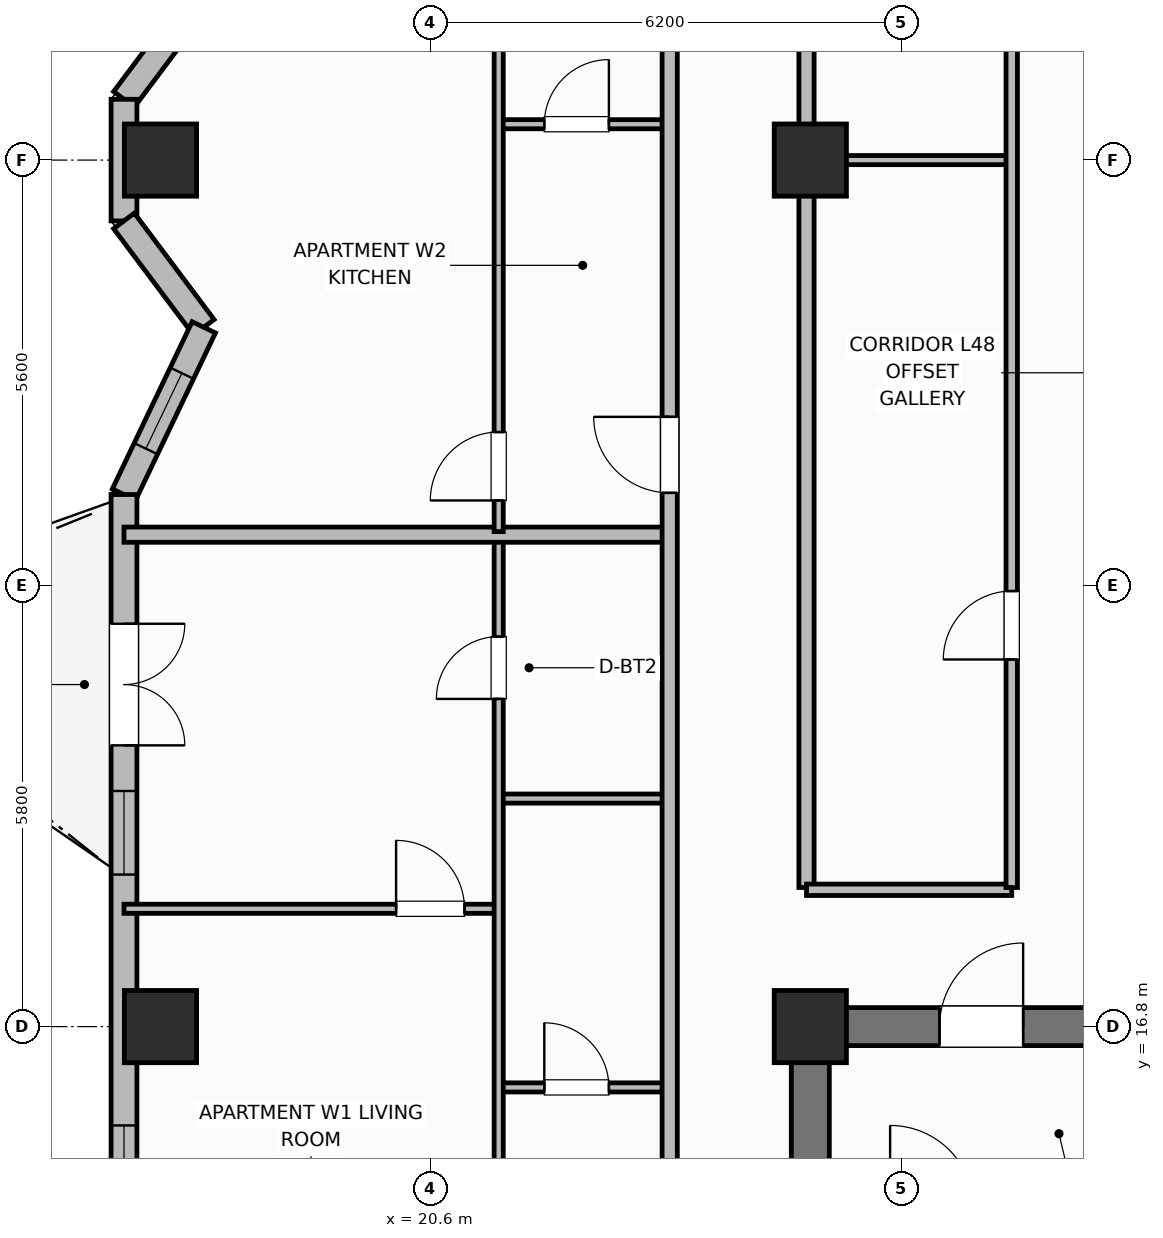
"""IFC4 building model, lengths in metres.
Left out: names, types, materials, properties, quantities, classifications, styles, units other than length and angle.
Written with IfcOpenShell. Run it as: python <this file> out.ifc"""

import sys

from ifc_helpers import new_model, si_unit, direction, frame, frame_2d, origin, origin_2d, place, context, subcontext, project, spatial, rectangle, extrude, element, fill, save


model = new_model("IFC4")
c1 = context("Model", 3, precision=1e-05, world=origin(), true_north=direction((0.0, 1.0)))
c2 = subcontext(c1, "Body", "Model", "MODEL_VIEW")
j1 = project(units=[si_unit("LENGTHUNIT", "METRE"), si_unit("PLANEANGLEUNIT", "RADIAN")], contexts=[c1])
p1 = place(None, origin())
s1 = spatial("IfcSite", under=j1, at=p1, CompositionType="ELEMENT")
p2 = place(p1, origin())
s2 = spatial("IfcBuilding", under=s1, at=p2, CompositionType="ELEMENT")
p3 = place(p2, frame((0.0, 0.0, 192.2)))
s3 = spatial("IfcBuildingStorey", under=s2, at=p3, CompositionType="ELEMENT", Elevation=192.2)
p4 = place(p3, frame((25.6, 10.85, 0.0), z_axis=(0.0, 0.0, 1.0), x_axis=(0.0, 1.0, 0.0)))
e1 = element("IfcWall", 1, at=p4, inside=s3, PredefinedType="SHEAR", context=c2, shape_type="SweptSolid", body=[
    extrude(rectangle(XDim=5.7, YDim=0.5, at=frame_2d((2.85, 0.0))), origin(), (0.0, 0.0, 1.0), 3.7),
])
p5 = place(p3, frame((25.6, 16.8, 0.0), z_axis=(0.0, 0.0, 1.0), x_axis=(1.0, 0.0, 0.0)))
e2 = element("IfcWall", 2, at=p5, inside=s3, PredefinedType="SHEAR", context=c2, shape_type="SweptSolid", body=[
    extrude(rectangle(XDim=27.2, YDim=0.5, at=frame_2d((13.6, 0.0))), origin(), (0.0, 0.0, 1.0), 3.7),
])
p6 = place(p5, frame((1.7, 0.0, 0.0)))
e3 = element("IfcOpeningElement", 3, at=p6, cuts=e2, PredefinedType="OPENING", context=c2, shape_type="SweptSolid", body=[
    extrude(rectangle(XDim=1.1, YDim=2.15, at=frame_2d((0.55, 1.075))), frame((0.0, 0.26, 0.0), z_axis=(0.0, -1.0, 0.0), x_axis=(1.0, 0.0, 0.0)), (0.0, 0.0, 1.0), 0.52),
])
p7 = place(p5, frame((4.45, 0.0, 0.0)))
e4 = element("IfcOpeningElement", 4, at=p7, cuts=e2, PredefinedType="OPENING", context=c2, shape_type="SweptSolid", body=[
    extrude(rectangle(XDim=0.85, YDim=2.1, at=frame_2d((0.425, 1.05))), frame((0.0, 0.26, 0.0), z_axis=(0.0, -1.0, 0.0), x_axis=(1.0, 0.0, 0.0)), (0.0, 0.0, 1.0), 0.52),
])
p8 = place(p5, frame((6.5, 0.0, 0.0)))
e5 = element("IfcOpeningElement", 5, at=p8, cuts=e2, PredefinedType="OPENING", context=c2, shape_type="SweptSolid", body=[
    extrude(rectangle(XDim=0.85, YDim=2.1, at=frame_2d((0.425, 1.05))), frame((0.0, 0.26, 0.0), z_axis=(0.0, -1.0, 0.0), x_axis=(1.0, 0.0, 0.0)), (0.0, 0.0, 1.0), 0.52),
])
p9 = place(p5, frame((13.0, 0.0, 0.0)))
e6 = element("IfcOpeningElement", 6, at=p9, cuts=e2, PredefinedType="OPENING", context=c2, shape_type="SweptSolid", body=[
    extrude(rectangle(XDim=1.2, YDim=2.15, at=frame_2d((0.6, 1.075))), frame((0.0, 0.26, 0.0), z_axis=(0.0, -1.0, 0.0), x_axis=(1.0, 0.0, 0.0)), (0.0, 0.0, 1.0), 0.52),
])
p10 = place(p5, frame((19.8, 0.0, 0.0)))
e7 = element("IfcOpeningElement", 7, at=p10, cuts=e2, PredefinedType="OPENING", context=c2, shape_type="SweptSolid", body=[
    extrude(rectangle(XDim=0.85, YDim=2.1, at=frame_2d((0.425, 1.05))), frame((0.0, 0.26, 0.0), z_axis=(0.0, -1.0, 0.0), x_axis=(1.0, 0.0, 0.0)), (0.0, 0.0, 1.0), 0.52),
])
p11 = place(p5, frame((24.2, 0.0, 0.0)))
e8 = element("IfcOpeningElement", 8, at=p11, cuts=e2, PredefinedType="OPENING", context=c2, shape_type="SweptSolid", body=[
    extrude(rectangle(XDim=0.85, YDim=2.1, at=frame_2d((0.425, 1.05))), frame((0.0, 0.26, 0.0), z_axis=(0.0, -1.0, 0.0), x_axis=(1.0, 0.0, 0.0)), (0.0, 0.0, 1.0), 0.52),
])
for number, where, z_axis, x_axis in (
    (9, (25.6, 16.8, 0.0), (0.0, 0.0, 1.0), (1.0, 0.0, 0.0)),
    (10, (25.6, 28.2, 0.0), (0.0, 0.0, 1.0), (1.0, 0.0, 0.0)),
    (11, (17.05, 16.8, 0.0), (0.0, 0.0, 1.0), (1.0, 0.0, 0.0)),
    (12, (17.05, 28.2, 0.0), (0.0, 0.0, 1.0), (1.0, 0.0, 0.0)),
):
    element("IfcColumn", number, at=place(p3, frame(where, z_axis=z_axis, x_axis=x_axis)), inside=s3, PredefinedType="COLUMN", context=c2, shape_type="SweptSolid", body=[
        extrude(rectangle(XDim=0.95, YDim=0.95, at=origin_2d()), origin(), (0.0, 0.0, 1.0), 3.7),
    ])
p12 = place(p3, frame((17.62, 30.4, 0.0), z_axis=(0.0, 0.0, 1.0), x_axis=(-0.600044643168, -0.799966515677, 0.0)))
e13 = element("IfcWall", 13, at=p12, inside=s3, PredefinedType="SOLIDWALL", context=c2, shape_type="SweptSolid", body=[
    extrude(rectangle(XDim=1.75, YDim=0.34, at=frame_2d((0.875, 0.0))), origin(), (0.0, 0.0, 1.0), 2.66),
])
p13 = place(p3, frame((16.57, 29.0, 0.0), z_axis=(0.0, 0.0, 1.0), x_axis=(0.0, -1.0, 0.0)))
e14 = element("IfcWall", 14, at=p13, inside=s3, PredefinedType="SOLIDWALL", context=c2, shape_type="SweptSolid", body=[
    extrude(rectangle(XDim=1.6, YDim=0.34, at=frame_2d((0.8, 0.0))), origin(), (0.0, 0.0, 1.0), 2.66),
])
p14 = place(p3, frame((16.57, 27.4, 0.0), z_axis=(0.0, 0.0, 1.0), x_axis=(0.600044643168, -0.799966515677, 0.0)))
e15 = element("IfcWall", 15, at=p14, inside=s3, PredefinedType="SOLIDWALL", context=c2, shape_type="SweptSolid", body=[
    extrude(rectangle(XDim=1.75, YDim=0.34, at=frame_2d((0.875, 0.0))), origin(), (0.0, 0.0, 1.0), 2.66),
])
p15 = place(p3, frame((17.62, 26.0, 0.0), z_axis=(0.0, 0.0, 1.0), x_axis=(-0.430753686581, -0.902469534941, 0.0)))
e16 = element("IfcWall", 16, at=p15, inside=s3, PredefinedType="SOLIDWALL", context=c2, shape_type="SweptSolid", body=[
    extrude(rectangle(XDim=2.438, YDim=0.34, at=frame_2d((1.219, 0.0))), origin(), (0.0, 0.0, 1.0), 2.66),
])
p16 = place(p15, frame((0.669, 0.0, 0.85)))
e17 = element("IfcOpeningElement", 17, at=p16, cuts=e16, PredefinedType="OPENING", context=c2, shape_type="SweptSolid", body=[
    extrude(rectangle(XDim=1.1, YDim=1.65, at=frame_2d((0.55, 0.825))), frame((0.0, 0.18, 0.0), z_axis=(0.0, -1.0, 0.0), x_axis=(1.0, 0.0, 0.0)), (0.0, 0.0, 1.0), 0.36),
])
p17 = place(p3, frame((16.57, 23.8, 0.0), z_axis=(0.0, 0.0, 1.0), x_axis=(0.0, -1.0, 0.0)))
e18 = element("IfcWall", 18, at=p17, inside=s3, PredefinedType="SOLIDWALL", context=c2, shape_type="SweptSolid", body=[
    extrude(rectangle(XDim=13.3, YDim=0.34, at=frame_2d((6.65, 0.0))), origin(), (0.0, 0.0, 1.0), 2.66),
])
p18 = place(p17, frame((1.7, 0.0, 0.0)))
e19 = element("IfcOpeningElement", 19, at=p18, cuts=e18, PredefinedType="OPENING", context=c2, shape_type="SweptSolid", body=[
    extrude(rectangle(XDim=1.6, YDim=2.1, at=frame_2d((0.8, 1.05))), frame((0.0, 0.18, 0.0), z_axis=(0.0, -1.0, 0.0), x_axis=(1.0, 0.0, 0.0)), (0.0, 0.0, 1.0), 0.36),
])
p19 = place(p17, frame((3.9, 0.0, 0.89)))
e20 = element("IfcOpeningElement", 20, at=p19, cuts=e18, PredefinedType="OPENING", context=c2, shape_type="SweptSolid", body=[
    extrude(rectangle(XDim=1.1, YDim=1.65, at=frame_2d((0.55, 0.825))), frame((0.0, 0.18, 0.0), z_axis=(0.0, -1.0, 0.0), x_axis=(1.0, 0.0, 0.0)), (0.0, 0.0, 1.0), 0.36),
])
p20 = place(p17, frame((8.3, 0.0, 0.89)))
e21 = element("IfcOpeningElement", 21, at=p20, cuts=e18, PredefinedType="OPENING", context=c2, shape_type="SweptSolid", body=[
    extrude(rectangle(XDim=1.1, YDim=1.65, at=frame_2d((0.55, 0.825))), frame((0.0, 0.18, 0.0), z_axis=(0.0, -1.0, 0.0), x_axis=(1.0, 0.0, 0.0)), (0.0, 0.0, 1.0), 0.36),
])
p21 = place(p17, frame((10.6, 0.0, 0.89)))
e22 = element("IfcOpeningElement", 22, at=p21, cuts=e18, PredefinedType="OPENING", context=c2, shape_type="SweptSolid", body=[
    extrude(rectangle(XDim=1.1, YDim=1.65, at=frame_2d((0.55, 0.825))), frame((0.0, 0.18, 0.0), z_axis=(0.0, -1.0, 0.0), x_axis=(1.0, 0.0, 0.0)), (0.0, 0.0, 1.0), 0.36),
])
p22 = place(p3, frame((25.55, 18.63, 0.0), z_axis=(0.0, 0.0, 1.0), x_axis=(0.0, 1.0, 0.0)))
e23 = element("IfcWall", 23, at=p22, inside=s3, PredefinedType="PARTITIONING", context=c2, shape_type="SweptSolid", body=[
    extrude(rectangle(XDim=19.14, YDim=0.2, at=frame_2d((9.57, 0.0))), origin(), (0.0, 0.0, 1.0), 2.49),
])
p23 = place(p3, frame((25.55, 18.6, 0.0), z_axis=(0.0, 0.0, 1.0), x_axis=(1.0, 0.0, 0.0)))
e24 = element("IfcWall", 24, at=p23, inside=s3, PredefinedType="PARTITIONING", context=c2, shape_type="SweptSolid", body=[
    extrude(rectangle(XDim=2.7, YDim=0.15, at=frame_2d((1.35, 0.0))), origin(), (0.0, 0.0, 1.0), 2.49),
])
p24 = place(p3, frame((25.6, 28.2, 0.0), z_axis=(0.0, 0.0, 1.0), x_axis=(1.0, 0.0, 0.0)))
e25 = element("IfcWall", 25, at=p24, inside=s3, PredefinedType="PARTITIONING", context=c2, shape_type="SweptSolid", body=[
    extrude(rectangle(XDim=2.66, YDim=0.12, at=frame_2d((1.33, 0.0))), origin(), (0.0, 0.0, 1.0), 2.49),
])
p25 = place(p3, frame((28.25, 18.63, 0.0), z_axis=(0.0, 0.0, 1.0), x_axis=(0.0, 1.0, 0.0)))
e26 = element("IfcWall", 26, at=p25, inside=s3, PredefinedType="PARTITIONING", context=c2, shape_type="SweptSolid", body=[
    extrude(rectangle(XDim=19.14, YDim=0.15, at=frame_2d((9.57, 0.0))), origin(), (0.0, 0.0, 1.0), 2.49),
])
p26 = place(p25, frame((3.0, 0.0, 0.0)))
e27 = element("IfcOpeningElement", 27, at=p26, cuts=e26, PredefinedType="OPENING", context=c2, shape_type="SweptSolid", body=[
    extrude(rectangle(XDim=0.9, YDim=2.1, at=frame_2d((0.45, 1.05))), frame((0.0, 0.085, 0.0), z_axis=(0.0, -1.0, 0.0), x_axis=(1.0, 0.0, 0.0)), (0.0, 0.0, 1.0), 0.17),
])
p27 = place(p25, frame((11.5, 0.0, 0.0)))
e28 = element("IfcOpeningElement", 28, at=p27, cuts=e26, PredefinedType="OPENING", context=c2, shape_type="SweptSolid", body=[
    extrude(rectangle(XDim=0.9, YDim=2.1, at=frame_2d((0.45, 1.05))), frame((0.0, 0.085, 0.0), z_axis=(0.0, -1.0, 0.0), x_axis=(1.0, 0.0, 0.0)), (0.0, 0.0, 1.0), 0.17),
])
p28 = place(p3, frame((21.5, 16.0, 0.0), z_axis=(0.0, 0.0, 1.0), x_axis=(1.0, 0.0, 0.0)))
e29 = element("IfcWall", 29, at=p28, inside=s3, PredefinedType="PARTITIONING", context=c2, shape_type="SweptSolid", body=[
    extrude(rectangle(XDim=2.25, YDim=0.12, at=frame_2d((1.125, 0.0))), origin(), (0.0, 0.0, 1.0), 2.49),
])
p29 = place(p28, frame((0.6, 0.0, 0.0)))
e30 = element("IfcOpeningElement", 30, at=p29, cuts=e29, PredefinedType="OPENING", context=c2, shape_type="SweptSolid", body=[
    extrude(rectangle(XDim=0.85, YDim=2.1, at=frame_2d((0.425, 1.05))), frame((0.0, 0.07, 0.0), z_axis=(0.0, -1.0, 0.0), x_axis=(1.0, 0.0, 0.0)), (0.0, 0.0, 1.0), 0.14),
])
p30 = place(p3, frame((21.5, 19.8, 0.0), z_axis=(0.0, 0.0, 1.0), x_axis=(1.0, 0.0, 0.0)))
e31 = element("IfcWall", 31, at=p30, inside=s3, PredefinedType="PARTITIONING", context=c2, shape_type="SweptSolid", body=[
    extrude(rectangle(XDim=2.25, YDim=0.12, at=frame_2d((1.125, 0.0))), origin(), (0.0, 0.0, 1.0), 2.49),
])
p31 = place(p3, frame((16.57, 18.35, 0.0), z_axis=(0.0, 0.0, 1.0), x_axis=(1.0, 0.0, 0.0)))
e32 = element("IfcWall", 32, at=p31, inside=s3, PredefinedType="PARTITIONING", context=c2, shape_type="SweptSolid", body=[
    extrude(rectangle(XDim=4.93, YDim=0.12, at=frame_2d((2.465, 0.0))), origin(), (0.0, 0.0, 1.0), 2.49),
])
p32 = place(p31, frame((3.58, 0.0, 0.0)))
e33 = element("IfcOpeningElement", 33, at=p32, cuts=e32, PredefinedType="OPENING", context=c2, shape_type="SweptSolid", body=[
    extrude(rectangle(XDim=0.9, YDim=2.1, at=frame_2d((0.45, 1.05))), frame((0.0, 0.07, 0.0), z_axis=(0.0, -1.0, 0.0), x_axis=(1.0, 0.0, 0.0)), (0.0, 0.0, 1.0), 0.14),
])
p33 = place(p3, frame((21.5, 10.64, 0.0), z_axis=(0.0, 0.0, 1.0), x_axis=(0.0, 1.0, 0.0)))
e34 = element("IfcWall", 34, at=p33, inside=s3, PredefinedType="PARTITIONING", context=c2, shape_type="SweptSolid", body=[
    extrude(rectangle(XDim=12.592, YDim=0.12, at=frame_2d((6.296, 0.0))), origin(), (0.0, 0.0, 1.0), 2.49),
])
p34 = place(p33, frame((0.41, 0.0, 0.0)))
e35 = element("IfcOpeningElement", 35, at=p34, cuts=e34, PredefinedType="OPENING", context=c2, shape_type="SweptSolid", body=[
    extrude(rectangle(XDim=0.9, YDim=2.1, at=frame_2d((0.45, 1.05))), frame((0.0, 0.07, 0.0), z_axis=(0.0, -1.0, 0.0), x_axis=(1.0, 0.0, 0.0)), (0.0, 0.0, 1.0), 0.14),
])
p35 = place(p33, frame((10.471, 0.0, 0.0)))
e36 = element("IfcOpeningElement", 36, at=p35, cuts=e34, PredefinedType="OPENING", context=c2, shape_type="SweptSolid", body=[
    extrude(rectangle(XDim=0.82, YDim=2.08, at=frame_2d((0.41, 1.04))), frame((0.0, 0.07, 0.0), z_axis=(0.0, -1.0, 0.0), x_axis=(1.0, 0.0, 0.0)), (0.0, 0.0, 1.0), 0.14),
])
p36 = place(p3, frame((16.57, 23.272, 0.0), z_axis=(0.0, 0.0, 1.0), x_axis=(1.0, 0.0, 0.0)))
e37 = element("IfcWall", 37, at=p36, inside=s3, PredefinedType="PARTITIONING", context=c2, shape_type="SweptSolid", body=[
    extrude(rectangle(XDim=7.18, YDim=0.2, at=frame_2d((3.59, 0.0))), origin(), (0.0, 0.0, 1.0), 2.49),
])
p37 = place(p3, frame((21.5, 28.672, 0.0), z_axis=(0.0, 0.0, 1.0), x_axis=(1.0, 0.0, 0.0)))
e38 = element("IfcWall", 38, at=p37, inside=s3, PredefinedType="PARTITIONING", context=c2, shape_type="SweptSolid", body=[
    extrude(rectangle(XDim=2.25, YDim=0.12, at=frame_2d((1.125, 0.0))), origin(), (0.0, 0.0, 1.0), 2.49),
])
p38 = place(p37, frame((0.6, 0.0, 0.0)))
e39 = element("IfcOpeningElement", 39, at=p38, cuts=e38, PredefinedType="OPENING", context=c2, shape_type="SweptSolid", body=[
    extrude(rectangle(XDim=0.85, YDim=2.1, at=frame_2d((0.425, 1.05))), frame((0.0, 0.07, 0.0), z_axis=(0.0, -1.0, 0.0), x_axis=(1.0, 0.0, 0.0)), (0.0, 0.0, 1.0), 0.14),
])
p39 = place(p3, frame((21.5, 23.312, 0.0), z_axis=(0.0, 0.0, 1.0), x_axis=(0.0, 1.0, 0.0)))
e40 = element("IfcWall", 40, at=p39, inside=s3, PredefinedType="PARTITIONING", context=c2, shape_type="SweptSolid", body=[
    extrude(rectangle(XDim=11.536, YDim=0.12, at=frame_2d((5.768, 0.0))), origin(), (0.0, 0.0, 1.0), 2.49),
])
p40 = place(p39, frame((0.41, 0.0, 0.0)))
e41 = element("IfcOpeningElement", 41, at=p40, cuts=e40, PredefinedType="OPENING", context=c2, shape_type="SweptSolid", body=[
    extrude(rectangle(XDim=0.9, YDim=2.1, at=frame_2d((0.45, 1.05))), frame((0.0, 0.07, 0.0), z_axis=(0.0, -1.0, 0.0), x_axis=(1.0, 0.0, 0.0)), (0.0, 0.0, 1.0), 0.14),
])
p41 = place(p3, frame((23.75, 10.6, 0.0), z_axis=(0.0, 0.0, 1.0), x_axis=(0.0, 1.0, 0.0)))
e42 = element("IfcWall", 42, at=p41, inside=s3, PredefinedType="PARTITIONING", context=c2, shape_type="SweptSolid", body=[
    extrude(rectangle(XDim=35.2, YDim=0.2, at=frame_2d((17.6, 0.0))), origin(), (0.0, 0.0, 1.0), 2.49),
])
p42 = place(p41, frame((2.65, 0.0, 0.0)))
e43 = element("IfcOpeningElement", 43, at=p42, cuts=e42, PredefinedType="OPENING", context=c2, shape_type="SweptSolid", body=[
    extrude(rectangle(XDim=1.0, YDim=2.15, at=frame_2d((0.5, 1.075))), frame((0.0, 0.11, 0.0), z_axis=(0.0, -1.0, 0.0), x_axis=(1.0, 0.0, 0.0)), (0.0, 0.0, 1.0), 0.22),
])
p43 = place(p41, frame((13.222, 0.0, 0.0)))
e44 = element("IfcOpeningElement", 44, at=p43, cuts=e42, PredefinedType="OPENING", context=c2, shape_type="SweptSolid", body=[
    extrude(rectangle(XDim=1.0, YDim=2.15, at=frame_2d((0.5, 1.075))), frame((0.0, 0.11, 0.0), z_axis=(0.0, -1.0, 0.0), x_axis=(1.0, 0.0, 0.0)), (0.0, 0.0, 1.0), 0.22),
])
p44 = place(p41, frame((24.838, 0.0, 0.0)))
e45 = element("IfcOpeningElement", 45, at=p44, cuts=e42, PredefinedType="OPENING", context=c2, shape_type="SweptSolid", body=[
    extrude(rectangle(XDim=1.0, YDim=2.15, at=frame_2d((0.5, 1.075))), frame((0.0, 0.11, 0.0), z_axis=(0.0, -1.0, 0.0), x_axis=(1.0, 0.0, 0.0)), (0.0, 0.0, 1.0), 0.22),
])
p45 = place(p16, origin())
e46 = element("IfcWindow", 46, at=p45, inside=s3, PartitioningType="SINGLE_PANEL", PredefinedType="WINDOW", context=c2, shape_type="SweptSolid", body=[
    extrude(rectangle(XDim=1.1, YDim=1.65, at=frame_2d((0.55, 0.825))), frame((0.0, 0.03, 0.0), z_axis=(0.0, -1.0, 0.0), x_axis=(1.0, 0.0, 0.0)), (0.0, 0.0, 1.0), 0.06),
])
fill(e17, e46)
p46 = place(p18, origin())
e47 = element("IfcDoor", 47, at=p46, inside=s3, OperationType="DOUBLE_DOOR_SINGLE_SWING", PredefinedType="DOOR", context=c2, shape_type="SweptSolid", body=[
    extrude(rectangle(XDim=1.6, YDim=2.1, at=frame_2d((0.8, 1.05))), frame((0.0, 0.025, 0.0), z_axis=(0.0, -1.0, 0.0), x_axis=(1.0, 0.0, 0.0)), (0.0, 0.0, 1.0), 0.05),
])
fill(e19, e47)
p47 = place(p19, origin())
e48 = element("IfcWindow", 48, at=p47, inside=s3, PartitioningType="SINGLE_PANEL", PredefinedType="WINDOW", context=c2, shape_type="SweptSolid", body=[
    extrude(rectangle(XDim=1.1, YDim=1.65, at=frame_2d((0.55, 0.825))), frame((0.0, 0.03, 0.0), z_axis=(0.0, -1.0, 0.0), x_axis=(1.0, 0.0, 0.0)), (0.0, 0.0, 1.0), 0.06),
])
fill(e20, e48)
p48 = place(p20, origin())
e49 = element("IfcWindow", 49, at=p48, inside=s3, PartitioningType="SINGLE_PANEL", PredefinedType="WINDOW", context=c2, shape_type="SweptSolid", body=[
    extrude(rectangle(XDim=1.1, YDim=1.65, at=frame_2d((0.55, 0.825))), frame((0.0, 0.03, 0.0), z_axis=(0.0, -1.0, 0.0), x_axis=(1.0, 0.0, 0.0)), (0.0, 0.0, 1.0), 0.06),
])
fill(e21, e49)
p49 = place(p26, origin())
e50 = element("IfcDoor", 50, at=p49, inside=s3, OperationType="SINGLE_SWING_LEFT", PredefinedType="DOOR", context=c2, shape_type="SweptSolid", body=[
    extrude(rectangle(XDim=0.9, YDim=2.1, at=frame_2d((0.45, 1.05))), frame((0.0, 0.025, 0.0), z_axis=(0.0, -1.0, 0.0), x_axis=(1.0, 0.0, 0.0)), (0.0, 0.0, 1.0), 0.05),
])
fill(e27, e50)
p50 = place(p29, origin())
e51 = element("IfcDoor", 51, at=p50, inside=s3, OperationType="SINGLE_SWING_LEFT", PredefinedType="DOOR", context=c2, shape_type="SweptSolid", body=[
    extrude(rectangle(XDim=0.85, YDim=2.1, at=frame_2d((0.425, 1.05))), frame((0.0, 0.025, 0.0), z_axis=(0.0, -1.0, 0.0), x_axis=(1.0, 0.0, 0.0)), (0.0, 0.0, 1.0), 0.05),
])
fill(e30, e51)
p51 = place(p32, origin())
e52 = element("IfcDoor", 52, at=p51, inside=s3, OperationType="SINGLE_SWING_LEFT", PredefinedType="DOOR", context=c2, shape_type="SweptSolid", body=[
    extrude(rectangle(XDim=0.9, YDim=2.1, at=frame_2d((0.45, 1.05))), frame((0.0, 0.025, 0.0), z_axis=(0.0, -1.0, 0.0), x_axis=(1.0, 0.0, 0.0)), (0.0, 0.0, 1.0), 0.05),
])
fill(e33, e52)
p52 = place(p35, origin())
e53 = element("IfcDoor", 53, at=p52, inside=s3, OperationType="SINGLE_SWING_LEFT", PredefinedType="DOOR", context=c2, shape_type="SweptSolid", body=[
    extrude(rectangle(XDim=0.82, YDim=2.08, at=frame_2d((0.41, 1.04))), frame((0.0, 0.025, 0.0), z_axis=(0.0, -1.0, 0.0), x_axis=(1.0, 0.0, 0.0)), (0.0, 0.0, 1.0), 0.05),
])
fill(e36, e53)
p53 = place(p38, origin())
e54 = element("IfcDoor", 54, at=p53, inside=s3, OperationType="SINGLE_SWING_RIGHT", PredefinedType="DOOR", context=c2, shape_type="SweptSolid", body=[
    extrude(rectangle(XDim=0.85, YDim=2.1, at=frame_2d((0.425, 1.05))), frame((0.0, 0.025, 0.0), z_axis=(0.0, -1.0, 0.0), x_axis=(1.0, 0.0, 0.0)), (0.0, 0.0, 1.0), 0.05),
])
fill(e39, e54)
p54 = place(p40, origin())
e55 = element("IfcDoor", 55, at=p54, inside=s3, OperationType="SINGLE_SWING_LEFT", PredefinedType="DOOR", context=c2, shape_type="SweptSolid", body=[
    extrude(rectangle(XDim=0.9, YDim=2.1, at=frame_2d((0.45, 1.05))), frame((0.0, 0.025, 0.0), z_axis=(0.0, -1.0, 0.0), x_axis=(1.0, 0.0, 0.0)), (0.0, 0.0, 1.0), 0.05),
])
fill(e41, e55)
p55 = place(p43, origin())
e56 = element("IfcDoor", 56, at=p55, inside=s3, OperationType="SINGLE_SWING_RIGHT", PredefinedType="DOOR", context=c2, shape_type="SweptSolid", body=[
    extrude(rectangle(XDim=1.0, YDim=2.15, at=frame_2d((0.5, 1.075))), frame((0.0, 0.025, 0.0), z_axis=(0.0, -1.0, 0.0), x_axis=(1.0, 0.0, 0.0)), (0.0, 0.0, 1.0), 0.05),
])
fill(e44, e56)
p56 = place(p6, origin())
e57 = element("IfcDoor", 57, at=p56, inside=s3, OperationType="SINGLE_SWING_RIGHT", PredefinedType="DOOR", context=c2, shape_type="SweptSolid", body=[
    extrude(rectangle(XDim=1.1, YDim=2.15, at=frame_2d((0.55, 1.075))), frame((0.0, 0.025, 0.0), z_axis=(0.0, -1.0, 0.0), x_axis=(1.0, 0.0, 0.0)), (0.0, 0.0, 1.0), 0.05),
])
fill(e3, e57)
save(model, sys.argv[1])
